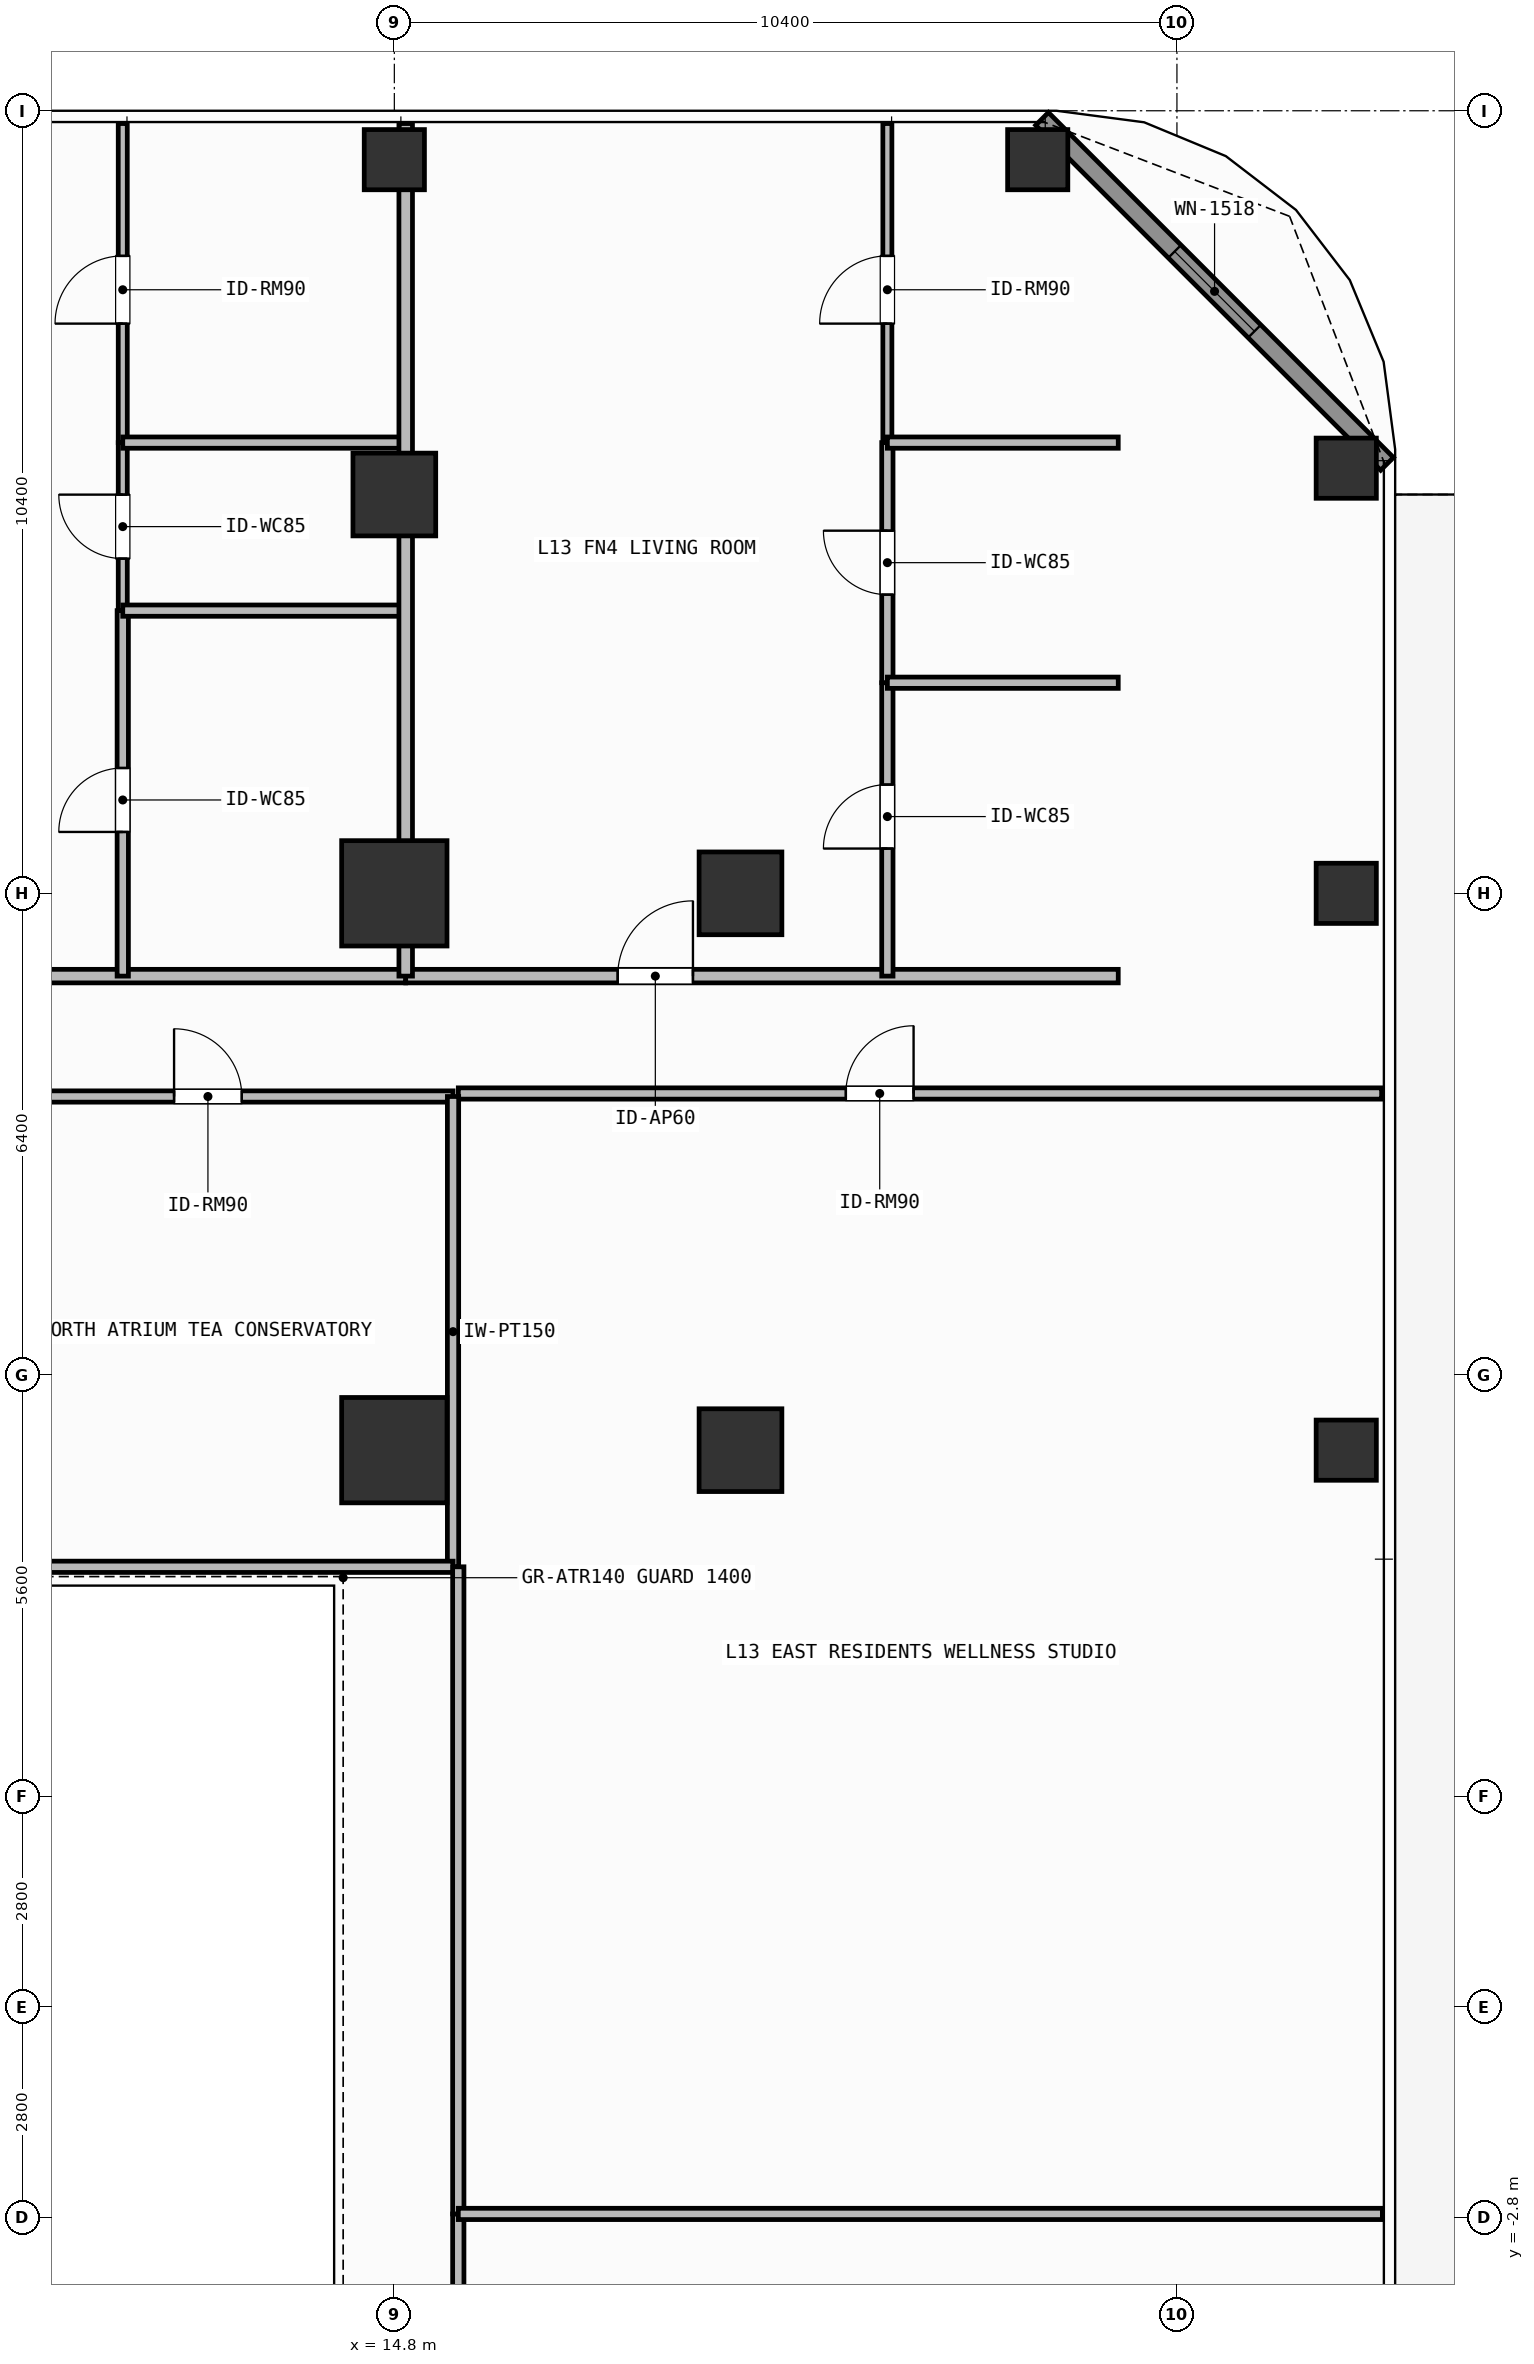
"""IFC4 building model, lengths in metres.
Left out: names, types, materials, properties, quantities, classifications, styles, units other than length and angle.
Written with IfcOpenShell. Run it as: python <this file> out.ifc"""

import sys

from ifc_helpers import new_model, si_unit, direction, frame, frame_2d, origin, origin_2d, place, context, subcontext, project, spatial, rectangle, hollow_rectangle, extrude, element, fill, save


model = new_model("IFC4")
c1 = context("Model", 3, precision=1e-05, world=origin(), true_north=direction((0.0, 1.0)))
c2 = subcontext(c1, "Body", "Model", "MODEL_VIEW")
j1 = project(units=[si_unit("LENGTHUNIT", "METRE"), si_unit("PLANEANGLEUNIT", "RADIAN")], contexts=[c1])
p1 = place(None, origin())
s1 = spatial("IfcSite", under=j1, at=p1, CompositionType="ELEMENT")
p2 = place(p1, origin())
s2 = spatial("IfcBuilding", under=s1, at=p2, CompositionType="ELEMENT")
p3 = place(p2, frame((0.0, 0.0, 50.1)))
s3 = spatial("IfcBuildingStorey", under=s2, at=p3, CompositionType="ELEMENT", Elevation=50.1)
for number, where, z_axis, x_axis in (
    (1, (14.8, 14.8, 0.0), (0.0, 0.0, 1.0), (1.0, 0.0, 0.0)),
    (2, (14.8, 7.4, 0.0), (0.0, 0.0, 1.0), (1.0, 0.0, 0.0)),
):
    element("IfcColumn", number, at=place(p3, frame(where, z_axis=z_axis, x_axis=x_axis)), inside=s3, PredefinedType="COLUMN", context=c2, shape_type="SweptSolid", body=[
        extrude(rectangle(XDim=1.4, YDim=1.4, at=origin_2d()), origin(), (0.0, 0.0, 1.0), 3.9),
    ])
for number, where, z_axis, x_axis in (
    (3, (19.4, 7.4, 0.0), (0.0, 0.0, 1.0), (1.0, 0.0, 0.0)),
    (4, (19.4, 14.8, 0.0), (0.0, 0.0, 1.0), (1.0, 0.0, 0.0)),
    (5, (14.8, 20.1, 0.0), (0.0, 0.0, 1.0), (1.0, 0.0, 0.0)),
):
    element("IfcColumn", number, at=place(p3, frame(where, z_axis=z_axis, x_axis=x_axis)), inside=s3, PredefinedType="COLUMN", context=c2, shape_type="SweptSolid", body=[
        extrude(rectangle(XDim=1.1, YDim=1.1, at=origin_2d()), origin(), (0.0, 0.0, 1.0), 3.9),
    ])
for number, where, z_axis, x_axis in (
    (6, (23.35, 24.55, 0.0), (0.0, 0.0, 1.0), (1.0, 0.0, 0.0)),
    (7, (27.45, 20.45, 0.0), (0.0, 0.0, 1.0), (1.0, 0.0, 0.0)),
    (8, (14.8, 24.55, 0.0), (0.0, 0.0, 1.0), (1.0, 0.0, 0.0)),
    (9, (27.45, 7.4, 0.0), (0.0, 0.0, 1.0), (1.0, 0.0, 0.0)),
    (10, (27.45, 14.8, 0.0), (0.0, 0.0, 1.0), (1.0, 0.0, 0.0)),
):
    element("IfcColumn", number, at=place(p3, frame(where, z_axis=z_axis, x_axis=x_axis)), inside=s3, PredefinedType="COLUMN", context=c2, shape_type="SweptSolid", body=[
        extrude(hollow_rectangle(XDim=0.8, YDim=0.8, WallThickness=0.036, at=origin_2d()), origin(), (0.0, 0.0, 1.0), 3.9),
    ])
p4 = place(p3, frame((23.408, 25.092, 0.0), z_axis=(0.0, 0.0, 1.0), x_axis=(0.707106781187, -0.707106781187, 0.0)))
e11 = element("IfcWall", 11, at=p4, inside=s3, PredefinedType="SOLIDWALL", context=c2, shape_type="SweptSolid", body=[
    extrude(rectangle(XDim=6.484, YDim=0.24, at=frame_2d((3.242, 0.0))), origin(), (0.0, 0.0, 1.0), 3.62),
])
p5 = place(p4, frame((2.492, 0.0, 0.8)))
e12 = element("IfcOpeningElement", 12, at=p5, cuts=e11, PredefinedType="OPENING", context=c2, shape_type="SweptSolid", body=[
    extrude(rectangle(XDim=1.5, YDim=1.85, at=frame_2d((0.75, 0.925))), frame((0.0, 0.13, 0.0), z_axis=(0.0, -1.0, 0.0), x_axis=(1.0, 0.0, 0.0)), (0.0, 0.0, 1.0), 0.26),
])
p6 = place(p3, frame((8.36, 12.1, 0.0), z_axis=(0.0, 0.0, 1.0), x_axis=(1.0, 0.0, 0.0)))
e13 = element("IfcWall", 13, at=p6, inside=s3, PredefinedType="PARTITIONING", context=c2, shape_type="SweptSolid", body=[
    extrude(rectangle(XDim=7.22, YDim=0.15, at=frame_2d((3.61, 0.0))), origin(), (0.0, 0.0, 1.0), 3.62),
])
p7 = place(p6, frame((3.513, 0.0, 0.0)))
e14 = element("IfcOpeningElement", 14, at=p7, cuts=e13, PredefinedType="OPENING", context=c2, shape_type="SweptSolid", body=[
    extrude(rectangle(XDim=0.9, YDim=2.1, at=frame_2d((0.45, 1.05))), frame((0.0, 0.085, 0.0), z_axis=(0.0, -1.0, 0.0), x_axis=(1.0, 0.0, 0.0)), (0.0, 0.0, 1.0), 0.17),
])
p8 = place(p3, frame((2.9, 13.7, 0.0), z_axis=(0.0, 0.0, 1.0), x_axis=(1.0, 0.0, 0.0)))
e15 = element("IfcWall", 15, at=p8, inside=s3, PredefinedType="PARTITIONING", context=c2, shape_type="SweptSolid", body=[
    extrude(rectangle(XDim=12.051, YDim=0.18, at=frame_2d((6.025, 0.0))), origin(), (0.0, 0.0, 1.0), 3.62),
])
p9 = place(p8, frame((5.347, 0.0, 0.0)))
e16 = element("IfcOpeningElement", 16, at=p9, cuts=e15, PredefinedType="OPENING", context=c2, shape_type="SweptSolid", body=[
    extrude(rectangle(XDim=1.0, YDim=2.2, at=frame_2d((0.5, 1.1))), frame((0.0, 0.1, 0.0), z_axis=(0.0, -1.0, 0.0), x_axis=(1.0, 0.0, 0.0)), (0.0, 0.0, 1.0), 0.2),
])
p10 = place(p3, frame((11.191, 13.7, 0.0), z_axis=(0.0, 0.0, 1.0), x_axis=(0.0, 1.0, 0.0)))
e17 = element("IfcWall", 17, at=p10, inside=s3, PredefinedType="PARTITIONING", context=c2, shape_type="SweptSolid", body=[
    extrude(rectangle(XDim=4.857, YDim=0.15, at=frame_2d((2.428, 0.0))), origin(), (0.0, 0.0, 1.0), 3.62),
])
p11 = place(p10, frame((1.916, 0.0, 0.0)))
e18 = element("IfcOpeningElement", 18, at=p11, cuts=e17, PredefinedType="OPENING", context=c2, shape_type="SweptSolid", body=[
    extrude(rectangle(XDim=0.85, YDim=2.1, at=frame_2d((0.425, 1.05))), frame((0.0, 0.085, 0.0), z_axis=(0.0, -1.0, 0.0), x_axis=(1.0, 0.0, 0.0)), (0.0, 0.0, 1.0), 0.17),
])
p12 = place(p3, frame((11.191, 18.557, 0.0), z_axis=(0.0, 0.0, 1.0), x_axis=(0.0, 1.0, 0.0)))
e19 = element("IfcWall", 19, at=p12, inside=s3, PredefinedType="PARTITIONING", context=c2, shape_type="SweptSolid", body=[
    extrude(rectangle(XDim=2.233, YDim=0.12, at=frame_2d((1.117, 0.0))), origin(), (0.0, 0.0, 1.0), 3.31),
])
p13 = place(p12, frame((0.691, 0.0, 0.0)))
e20 = element("IfcOpeningElement", 20, at=p13, cuts=e19, PredefinedType="OPENING", context=c2, shape_type="SweptSolid", body=[
    extrude(rectangle(XDim=0.85, YDim=2.1, at=frame_2d((0.425, 1.05))), frame((0.0, 0.07, 0.0), z_axis=(0.0, -1.0, 0.0), x_axis=(1.0, 0.0, 0.0)), (0.0, 0.0, 1.0), 0.14),
])
p14 = place(p3, frame((11.191, 20.79, 0.0), z_axis=(0.0, 0.0, 1.0), x_axis=(0.0, 1.0, 0.0)))
e21 = element("IfcWall", 21, at=p14, inside=s3, PredefinedType="PARTITIONING", context=c2, shape_type="SweptSolid", body=[
    extrude(rectangle(XDim=4.24, YDim=0.12, at=frame_2d((2.12, 0.0))), origin(), (0.0, 0.0, 1.0), 3.31),
])
p15 = place(p14, frame((1.581, 0.0, 0.0)))
e22 = element("IfcOpeningElement", 22, at=p15, cuts=e21, PredefinedType="OPENING", context=c2, shape_type="SweptSolid", body=[
    extrude(rectangle(XDim=0.9, YDim=2.1, at=frame_2d((0.45, 1.05))), frame((0.0, 0.07, 0.0), z_axis=(0.0, -1.0, 0.0), x_axis=(1.0, 0.0, 0.0)), (0.0, 0.0, 1.0), 0.14),
])
p16 = place(p3, frame((14.951, 13.7, 0.0), z_axis=(0.0, 0.0, 1.0), x_axis=(1.0, 0.0, 0.0)))
e23 = element("IfcWall", 23, at=p16, inside=s3, PredefinedType="PARTITIONING", context=c2, shape_type="SweptSolid", body=[
    extrude(rectangle(XDim=9.469, YDim=0.18, at=frame_2d((4.734, 0.0))), origin(), (0.0, 0.0, 1.0), 3.62),
])
p17 = place(p16, frame((2.817, 0.0, 0.0)))
e24 = element("IfcOpeningElement", 24, at=p17, cuts=e23, PredefinedType="OPENING", context=c2, shape_type="SweptSolid", body=[
    extrude(rectangle(XDim=1.0, YDim=2.2, at=frame_2d((0.5, 1.1))), frame((0.0, 0.1, 0.0), z_axis=(0.0, -1.0, 0.0), x_axis=(1.0, 0.0, 0.0)), (0.0, 0.0, 1.0), 0.2),
])
p18 = place(p3, frame((21.352, 13.7, 0.0), z_axis=(0.0, 0.0, 1.0), x_axis=(0.0, 1.0, 0.0)))
e25 = element("IfcWall", 25, at=p18, inside=s3, PredefinedType="PARTITIONING", context=c2, shape_type="SweptSolid", body=[
    extrude(rectangle(XDim=3.899, YDim=0.15, at=frame_2d((1.95, 0.0))), origin(), (0.0, 0.0, 1.0), 3.122),
])
p19 = place(p18, frame((1.695, 0.0, 0.0)))
e26 = element("IfcOpeningElement", 26, at=p19, cuts=e25, PredefinedType="OPENING", context=c2, shape_type="SweptSolid", body=[
    extrude(rectangle(XDim=0.85, YDim=2.1, at=frame_2d((0.425, 1.05))), frame((0.0, 0.085, 0.0), z_axis=(0.0, -1.0, 0.0), x_axis=(1.0, 0.0, 0.0)), (0.0, 0.0, 1.0), 0.17),
])
p20 = place(p3, frame((21.352, 17.599, 0.0), z_axis=(0.0, 0.0, 1.0), x_axis=(0.0, 1.0, 0.0)))
e27 = element("IfcWall", 27, at=p20, inside=s3, PredefinedType="PARTITIONING", context=c2, shape_type="SweptSolid", body=[
    extrude(rectangle(XDim=3.191, YDim=0.15, at=frame_2d((1.595, 0.0))), origin(), (0.0, 0.0, 1.0), 3.122),
])
p21 = place(p20, frame((1.17, 0.0, 0.0)))
e28 = element("IfcOpeningElement", 28, at=p21, cuts=e27, PredefinedType="OPENING", context=c2, shape_type="SweptSolid", body=[
    extrude(rectangle(XDim=0.85, YDim=2.1, at=frame_2d((0.425, 1.05))), frame((0.0, 0.085, 0.0), z_axis=(0.0, -1.0, 0.0), x_axis=(1.0, 0.0, 0.0)), (0.0, 0.0, 1.0), 0.17),
])
p22 = place(p3, frame((21.352, 20.79, 0.0), z_axis=(0.0, 0.0, 1.0), x_axis=(0.0, 1.0, 0.0)))
e29 = element("IfcWall", 29, at=p22, inside=s3, PredefinedType="PARTITIONING", context=c2, shape_type="SweptSolid", body=[
    extrude(rectangle(XDim=4.24, YDim=0.12, at=frame_2d((2.12, 0.0))), origin(), (0.0, 0.0, 1.0), 3.62),
])
p23 = place(p22, frame((1.581, 0.0, 0.0)))
e30 = element("IfcOpeningElement", 30, at=p23, cuts=e29, PredefinedType="OPENING", context=c2, shape_type="SweptSolid", body=[
    extrude(rectangle(XDim=0.9, YDim=2.1, at=frame_2d((0.45, 1.05))), frame((0.0, 0.07, 0.0), z_axis=(0.0, -1.0, 0.0), x_axis=(1.0, 0.0, 0.0)), (0.0, 0.0, 1.0), 0.14),
])
p24 = place(p3, frame((15.65, 12.14, 0.0), z_axis=(0.0, 0.0, 1.0), x_axis=(1.0, 0.0, 0.0)))
e31 = element("IfcWall", 31, at=p24, inside=s3, PredefinedType="PARTITIONING", context=c2, shape_type="SweptSolid", body=[
    extrude(rectangle(XDim=12.27, YDim=0.15, at=frame_2d((6.135, 0.0))), origin(), (0.0, 0.0, 1.0), 3.62),
])
p25 = place(p24, frame((5.15, 0.0, 0.0)))
e32 = element("IfcOpeningElement", 32, at=p25, cuts=e31, PredefinedType="OPENING", context=c2, shape_type="SweptSolid", body=[
    extrude(rectangle(XDim=0.9, YDim=2.1, at=frame_2d((0.45, 1.05))), frame((0.0, 0.085, 0.0), z_axis=(0.0, -1.0, 0.0), x_axis=(1.0, 0.0, 0.0)), (0.0, 0.0, 1.0), 0.17),
])
p26 = place(p3, frame((15.58, 5.85, 0.0), z_axis=(0.0, 0.0, 1.0), x_axis=(0.0, 1.0, 0.0)))
e33 = element("IfcWall", 33, at=p26, inside=s3, PredefinedType="PARTITIONING", context=c2, shape_type="SweptSolid", body=[
    extrude(rectangle(XDim=6.25, YDim=0.15, at=frame_2d((3.125, 0.0))), origin(), (0.0, 0.0, 1.0), 3.62),
])
p27 = place(p3, frame((8.96, 5.85, 0.0), z_axis=(0.0, 0.0, 1.0), x_axis=(1.0, 0.0, 0.0)))
e34 = element("IfcWall", 34, at=p27, inside=s3, PredefinedType="PARTITIONING", context=c2, shape_type="SweptSolid", body=[
    extrude(rectangle(XDim=6.62, YDim=0.15, at=frame_2d((3.31, 0.0))), origin(), (0.0, 0.0, 1.0), 3.62),
])
for number, where, z_axis, x_axis in (
    (35, (11.191, 18.557, 0.0), (0.0, 0.0, 1.0), (1.0, 0.0, 0.0)),
    (36, (11.191, 20.79, 0.0), (0.0, 0.0, 1.0), (1.0, 0.0, 0.0)),
):
    element("IfcWall", number, at=place(p3, frame(where, z_axis=z_axis, x_axis=x_axis)), inside=s3, PredefinedType="PARTITIONING", context=c2, shape_type="SweptSolid", body=[
        extrude(rectangle(XDim=3.76, YDim=0.15, at=frame_2d((1.88, 0.0))), origin(), (0.0, 0.0, 1.0), 3.62),
    ])
for number, where, z_axis, x_axis in (
    (37, (21.352, 17.599, 0.0), (0.0, 0.0, 1.0), (1.0, 0.0, 0.0)),
    (38, (21.352, 20.79, 0.0), (0.0, 0.0, 1.0), (1.0, 0.0, 0.0)),
):
    element("IfcWall", number, at=place(p3, frame(where, z_axis=z_axis, x_axis=x_axis)), inside=s3, PredefinedType="PARTITIONING", context=c2, shape_type="SweptSolid", body=[
        extrude(rectangle(XDim=3.068, YDim=0.15, at=frame_2d((1.534, 0.0))), origin(), (0.0, 0.0, 1.0), 3.62),
    ])
p28 = place(p3, frame((14.951, 13.7, 0.0), z_axis=(0.0, 0.0, 1.0), x_axis=(0.0, 1.0, 0.0)))
e39 = element("IfcWall", 39, at=p28, inside=s3, PredefinedType="PARTITIONING", context=c2, shape_type="SweptSolid", body=[
    extrude(rectangle(XDim=11.33, YDim=0.18, at=frame_2d((5.665, 0.0))), origin(), (0.0, 0.0, 1.0), 2.71),
])
p29 = place(p3, frame((15.65, -5.85, 0.0), z_axis=(0.0, 0.0, 1.0), x_axis=(0.0, 1.0, 0.0)))
e40 = element("IfcWall", 40, at=p29, inside=s3, PredefinedType="PARTITIONING", context=c2, shape_type="SweptSolid", body=[
    extrude(rectangle(XDim=3.1, YDim=0.15, at=frame_2d((1.55, 0.0))), origin(), (0.0, 0.0, 1.0), 3.62),
])
p30 = place(p3, frame((15.65, -2.75, 0.0), z_axis=(0.0, 0.0, 1.0), x_axis=(0.0, 1.0, 0.0)))
e41 = element("IfcWall", 41, at=p30, inside=s3, PredefinedType="PARTITIONING", context=c2, shape_type="SweptSolid", body=[
    extrude(rectangle(XDim=8.6, YDim=0.15, at=frame_2d((4.3, 0.0))), origin(), (0.0, 0.0, 1.0), 3.62),
])
p31 = place(p3, frame((15.65, -2.75, 0.0), z_axis=(0.0, 0.0, 1.0), x_axis=(1.0, 0.0, 0.0)))
e42 = element("IfcWall", 42, at=p31, inside=s3, PredefinedType="PARTITIONING", context=c2, shape_type="SweptSolid", body=[
    extrude(rectangle(XDim=12.28, YDim=0.15, at=frame_2d((6.14, 0.0))), origin(), (0.0, 0.0, 1.0), 3.62),
])
p32 = place(p5, origin())
e43 = element("IfcWindow", 43, at=p32, inside=s3, PartitioningType="SINGLE_PANEL", PredefinedType="WINDOW", context=c2, shape_type="SweptSolid", body=[
    extrude(rectangle(XDim=1.5, YDim=1.85, at=frame_2d((0.75, 0.925))), frame((0.0, 0.03, 0.0), z_axis=(0.0, -1.0, 0.0), x_axis=(1.0, 0.0, 0.0)), (0.0, 0.0, 1.0), 0.06),
])
fill(e12, e43)
p33 = place(p7, origin())
e44 = element("IfcDoor", 44, at=p33, inside=s3, OperationType="SINGLE_SWING_LEFT", PredefinedType="DOOR", context=c2, shape_type="SweptSolid", body=[
    extrude(rectangle(XDim=0.9, YDim=2.1, at=frame_2d((0.45, 1.05))), frame((0.0, 0.025, 0.0), z_axis=(0.0, -1.0, 0.0), x_axis=(1.0, 0.0, 0.0)), (0.0, 0.0, 1.0), 0.05),
])
fill(e14, e44)
p34 = place(p11, origin())
e45 = element("IfcDoor", 45, at=p34, inside=s3, OperationType="SINGLE_SWING_LEFT", PredefinedType="DOOR", context=c2, shape_type="SweptSolid", body=[
    extrude(rectangle(XDim=0.85, YDim=2.1, at=frame_2d((0.425, 1.05))), frame((0.0, 0.025, 0.0), z_axis=(0.0, -1.0, 0.0), x_axis=(1.0, 0.0, 0.0)), (0.0, 0.0, 1.0), 0.05),
])
fill(e18, e45)
p35 = place(p13, origin())
e46 = element("IfcDoor", 46, at=p35, inside=s3, OperationType="SINGLE_SWING_RIGHT", PredefinedType="DOOR", context=c2, shape_type="SweptSolid", body=[
    extrude(rectangle(XDim=0.85, YDim=2.1, at=frame_2d((0.425, 1.05))), frame((0.0, 0.025, 0.0), z_axis=(0.0, -1.0, 0.0), x_axis=(1.0, 0.0, 0.0)), (0.0, 0.0, 1.0), 0.05),
])
fill(e20, e46)
p36 = place(p15, origin())
e47 = element("IfcDoor", 47, at=p36, inside=s3, OperationType="SINGLE_SWING_LEFT", PredefinedType="DOOR", context=c2, shape_type="SweptSolid", body=[
    extrude(rectangle(XDim=0.9, YDim=2.1, at=frame_2d((0.45, 1.05))), frame((0.0, 0.025, 0.0), z_axis=(0.0, -1.0, 0.0), x_axis=(1.0, 0.0, 0.0)), (0.0, 0.0, 1.0), 0.05),
])
fill(e22, e47)
p37 = place(p17, origin())
e48 = element("IfcDoor", 48, at=p37, inside=s3, OperationType="SINGLE_SWING_RIGHT", PredefinedType="DOOR", context=c2, shape_type="SweptSolid", body=[
    extrude(rectangle(XDim=1.0, YDim=2.2, at=frame_2d((0.5, 1.1))), frame((0.0, 0.025, 0.0), z_axis=(0.0, -1.0, 0.0), x_axis=(1.0, 0.0, 0.0)), (0.0, 0.0, 1.0), 0.05),
])
fill(e24, e48)
p38 = place(p19, origin())
e49 = element("IfcDoor", 49, at=p38, inside=s3, OperationType="SINGLE_SWING_LEFT", PredefinedType="DOOR", context=c2, shape_type="SweptSolid", body=[
    extrude(rectangle(XDim=0.85, YDim=2.1, at=frame_2d((0.425, 1.05))), frame((0.0, 0.025, 0.0), z_axis=(0.0, -1.0, 0.0), x_axis=(1.0, 0.0, 0.0)), (0.0, 0.0, 1.0), 0.05),
])
fill(e26, e49)
p39 = place(p21, origin())
e50 = element("IfcDoor", 50, at=p39, inside=s3, OperationType="SINGLE_SWING_RIGHT", PredefinedType="DOOR", context=c2, shape_type="SweptSolid", body=[
    extrude(rectangle(XDim=0.85, YDim=2.1, at=frame_2d((0.425, 1.05))), frame((0.0, 0.025, 0.0), z_axis=(0.0, -1.0, 0.0), x_axis=(1.0, 0.0, 0.0)), (0.0, 0.0, 1.0), 0.05),
])
fill(e28, e50)
p40 = place(p23, origin())
e51 = element("IfcDoor", 51, at=p40, inside=s3, OperationType="SINGLE_SWING_LEFT", PredefinedType="DOOR", context=c2, shape_type="SweptSolid", body=[
    extrude(rectangle(XDim=0.9, YDim=2.1, at=frame_2d((0.45, 1.05))), frame((0.0, 0.025, 0.0), z_axis=(0.0, -1.0, 0.0), x_axis=(1.0, 0.0, 0.0)), (0.0, 0.0, 1.0), 0.05),
])
fill(e30, e51)
p41 = place(p25, origin())
e52 = element("IfcDoor", 52, at=p41, inside=s3, OperationType="SINGLE_SWING_RIGHT", PredefinedType="DOOR", context=c2, shape_type="SweptSolid", body=[
    extrude(rectangle(XDim=0.9, YDim=2.1, at=frame_2d((0.45, 1.05))), frame((0.0, 0.025, 0.0), z_axis=(0.0, -1.0, 0.0), x_axis=(1.0, 0.0, 0.0)), (0.0, 0.0, 1.0), 0.05),
])
fill(e32, e52)
save(model, sys.argv[1])
